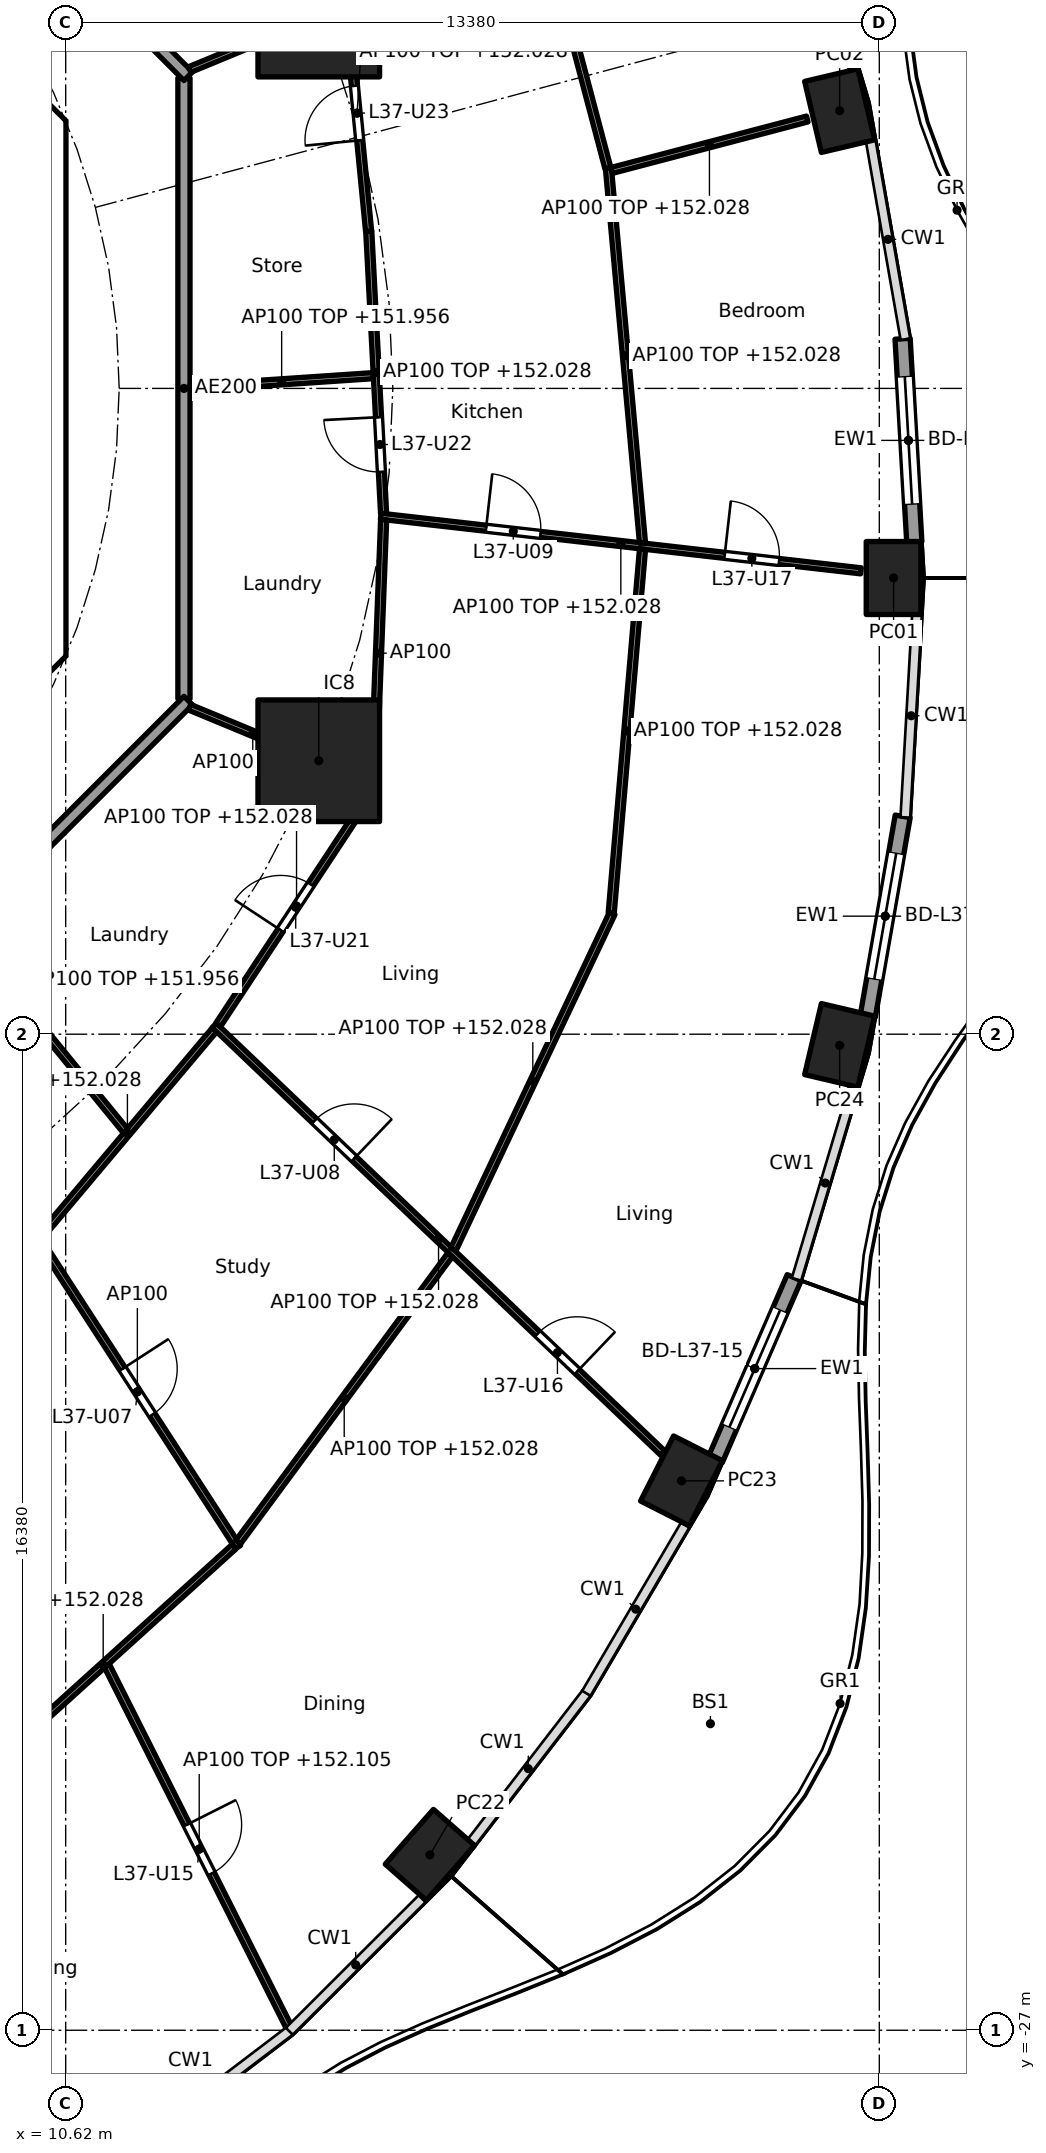
"""IFC4 building model, lengths in metres.
Left out: names, types, materials, properties, quantities, classifications, styles, units other than length and angle.
Written with IfcOpenShell. Run it as: python <this file> out.ifc"""

import sys

from ifc_helpers import new_model, si_unit, direction, frame, frame_2d, origin, origin_2d, place, context, subcontext, project, spatial, polyline, rectangle, hollow_rectangle, outline, extrude, element, fill, save


model = new_model("IFC4")
c1 = context("Model", 3, precision=1e-05, world=origin(), true_north=direction((0.0, 1.0)))
c2 = subcontext(c1, "Body", "Model", "MODEL_VIEW")
j1 = project(units=[si_unit("LENGTHUNIT", "METRE"), si_unit("PLANEANGLEUNIT", "RADIAN")], contexts=[c1])
p1 = place(None, origin())
s1 = spatial("IfcSite", under=j1, at=p1, CompositionType="ELEMENT")
p2 = place(p1, origin())
s2 = spatial("IfcBuilding", under=s1, at=p2, CompositionType="ELEMENT")
p3 = place(p2, frame((0.0, 0.0, 149.2)))
s3 = spatial("IfcBuildingStorey", under=s2, at=p3, CompositionType="ELEMENT", Elevation=149.2)
for number, where, z_axis, x_axis in (
    (1, (24.235, -3.118, 0.0), (0.0, 0.0, 1.0), (0.0, 1.0, 0.0)),
    (2, (23.348, 4.568, 0.0), (0.0, 0.0, 1.0), (-0.229, 0.973, 0.0)),
    (3, (16.61, -24.115, 0.0), (0.0, 0.0, 1.0), (0.66, 0.751, 0.0)),
    (4, (20.747, -17.965, 0.0), (0.0, 0.0, 1.0), (0.452, 0.892, 0.0)),
    (5, (23.348, -10.803, 0.0), (0.0, 0.0, 1.0), (0.229, 0.973, 0.0)),
):
    element("IfcColumn", number, at=place(p3, frame(where, z_axis=z_axis, x_axis=x_axis)), inside=s3, PredefinedType="COLUMN", context=c2, shape_type="SweptSolid", body=[
        extrude(hollow_rectangle(XDim=1.2, YDim=0.9, WallThickness=0.04, at=origin_2d()), origin(), (0.0, 0.0, 1.0), 3.7),
    ])
for number, where, z_axis, x_axis in (
    (6, (14.782, 6.123, 0.0), (0.0, 0.0, 1.0), (1.0, 0.0, 0.0)),
    (7, (14.782, -6.123, 0.0), (0.0, 0.0, 1.0), (1.0, 0.0, 0.0)),
):
    element("IfcColumn", number, at=place(p3, frame(where, z_axis=z_axis, x_axis=x_axis)), inside=s3, PredefinedType="COLUMN", context=c2, shape_type="SweptSolid", body=[
        extrude(rectangle(XDim=2.0, YDim=2.0, at=origin_2d()), origin(), (0.0, 0.0, 1.0), 3.7),
    ])
p4 = place(p3, frame((24.383, 0.816, 0.0), z_axis=(0.0, 0.0, 1.0), x_axis=(0.05746514539, -0.998347513176, 0.0)))
e8 = element("IfcWall", 8, at=p4, inside=s3, PredefinedType="SOLIDWALL", context=c2, shape_type="SweptSolid", body=[
    extrude(rectangle(XDim=3.348, YDim=0.25, at=frame_2d((1.674, 0.0))), origin(), (0.0, 0.0, 1.0), 3.44),
])
p5 = place(p4, frame((0.624, 0.0, 0.0)))
e9 = element("IfcOpeningElement", 9, at=p5, cuts=e8, PredefinedType="OPENING", context=c2, shape_type="SweptSolid", body=[
    extrude(rectangle(XDim=2.1, YDim=2.4, at=frame_2d((1.05, 1.2))), frame((0.0, 0.135, 0.0), z_axis=(0.0, -1.0, 0.0), x_axis=(1.0, 0.0, 0.0)), (0.0, 0.0, 1.0), 0.27),
])
p6 = place(p3, frame((22.6, -14.623, 0.0), z_axis=(0.0, 0.0, 1.0), x_axis=(-0.397575919276, -0.917569282622, 0.0)))
e10 = element("IfcWall", 10, at=p6, inside=s3, PredefinedType="SOLIDWALL", context=c2, shape_type="SweptSolid", body=[
    extrude(rectangle(XDim=3.261, YDim=0.25, at=frame_2d((1.63, 0.0))), origin(), (0.0, 0.0, 1.0), 3.44),
])
p7 = place(p6, frame((0.58, 0.0, 0.0)))
e11 = element("IfcOpeningElement", 11, at=p7, cuts=e10, PredefinedType="OPENING", context=c2, shape_type="SweptSolid", body=[
    extrude(rectangle(XDim=2.1, YDim=2.4, at=frame_2d((1.05, 1.2))), frame((0.0, 0.135, 0.0), z_axis=(0.0, -1.0, 0.0), x_axis=(1.0, 0.0, 0.0)), (0.0, 0.0, 1.0), 0.27),
])
p8 = place(p3, frame((24.385, -7.037, 0.0), z_axis=(0.0, 0.0, 1.0), x_axis=(-0.172163521006, -0.985068384446, 0.0)))
e12 = element("IfcWall", 12, at=p8, inside=s3, PredefinedType="SOLIDWALL", context=c2, shape_type="SweptSolid", body=[
    extrude(rectangle(XDim=3.333, YDim=0.25, at=frame_2d((1.666, 0.0))), origin(), (0.0, 0.0, 1.0), 3.44),
])
p9 = place(p8, frame((0.616, 0.0, 0.0)))
e13 = element("IfcOpeningElement", 13, at=p9, cuts=e12, PredefinedType="OPENING", context=c2, shape_type="SweptSolid", body=[
    extrude(rectangle(XDim=2.1, YDim=2.4, at=frame_2d((1.05, 1.2))), frame((0.0, 0.135, 0.0), z_axis=(0.0, -1.0, 0.0), x_axis=(1.0, 0.0, 0.0)), (0.0, 0.0, 1.0), 0.27),
])
p10 = place(p3, origin())
e14 = element("IfcWall", 14, at=p10, inside=s3, PredefinedType="SHEAR", context=c2, shape_type="SweptSolid", body=[
    extrude(outline(polyline([(9.776, -4.401), (10.025, -4.152), (10.025, -3.801), (10.025, 4.152), (9.776, 4.401), (10.2, 4.825), (10.625, 4.401), (10.625, -4.401), (10.2, -4.825), (9.776, -4.401)])), origin(), (0.0, 0.0, 1.0), 3.44),
])
p11 = place(p3, frame((12.565, -5.104, 0.0), z_axis=(0.0, 0.0, 1.0), x_axis=(0.0, 1.0, 0.0)))
e15 = element("IfcWall", 15, at=p11, inside=s3, PredefinedType="PARTITIONING", context=c2, shape_type="SweptSolid", body=[
    extrude(rectangle(XDim=10.209, YDim=0.2, at=frame_2d((5.104, 0.0))), origin(), (0.0, 0.0, 1.0), 3.44),
])
p12 = place(p3, frame((12.635, 5.134, 0.0), z_axis=(0.0, 0.0, 1.0), x_axis=(-0.707106781187, 0.707106781187, 0.0)))
e16 = element("IfcWall", 16, at=p12, inside=s3, PredefinedType="PARTITIONING", context=c2, shape_type="SweptSolid", body=[
    extrude(rectangle(XDim=10.609, YDim=0.2, at=frame_2d((5.305, 0.0))), origin(), (0.0, 0.0, 1.0), 3.44),
])
p13 = place(p3, frame((5.275, -12.494, 0.0), z_axis=(0.0, 0.0, 1.0), x_axis=(0.707106781187, 0.707106781187, 0.0)))
e17 = element("IfcWall", 17, at=p13, inside=s3, PredefinedType="PARTITIONING", context=c2, shape_type="SweptSolid", body=[
    extrude(rectangle(XDim=10.409, YDim=0.2, at=frame_2d((5.205, 0.0))), origin(), (0.0, 0.0, 1.0), 3.44),
])
p14 = place(p3, frame((15.801, -2.103, 0.0), z_axis=(0.0, 0.0, 1.0), x_axis=(0.993607212763, -0.112892456544, 0.0)))
e18 = element("IfcWall", 18, at=p14, inside=s3, PredefinedType="PARTITIONING", context=c2, shape_type="SweptSolid", body=[
    extrude(rectangle(XDim=7.948, YDim=0.1, at=frame_2d((3.974, 0.0))), origin(), (0.0, 0.0, 1.0), 2.828),
])
p15 = place(p14, frame((1.743, 0.0, 0.0)))
e19 = element("IfcOpeningElement", 19, at=p15, cuts=e18, PredefinedType="OPENING", context=c2, shape_type="SweptSolid", body=[
    extrude(rectangle(XDim=0.9, YDim=2.1, at=frame_2d((0.45, 1.05))), frame((0.0, 0.06, 0.0), z_axis=(0.0, -1.0, 0.0), x_axis=(1.0, 0.0, 0.0)), (0.0, 0.0, 1.0), 0.12),
])
p16 = place(p14, frame((5.692, 0.0, 0.0)))
e20 = element("IfcOpeningElement", 20, at=p16, cuts=e18, PredefinedType="OPENING", context=c2, shape_type="SweptSolid", body=[
    extrude(rectangle(XDim=0.9, YDim=2.1, at=frame_2d((0.45, 1.05))), frame((0.0, 0.06, 0.0), z_axis=(0.0, -1.0, 0.0), x_axis=(1.0, 0.0, 0.0)), (0.0, 0.0, 1.0), 0.12),
])
p17 = place(p3, frame((15.848, -2.058, 0.0), z_axis=(0.0, 0.0, 1.0), x_axis=(-0.052509224895, 0.998620439056, 0.0)))
e21 = element("IfcWall", 21, at=p17, inside=s3, PredefinedType="PARTITIONING", context=c2, shape_type="SweptSolid", body=[
    extrude(rectangle(XDim=4.649, YDim=0.1, at=frame_2d((2.325, 0.0))), origin(), (0.0, 0.0, 1.0), 2.828),
])
p18 = place(p17, frame((0.687, 0.0, 0.0)))
e22 = element("IfcOpeningElement", 22, at=p18, cuts=e21, PredefinedType="OPENING", context=c2, shape_type="SweptSolid", body=[
    extrude(rectangle(XDim=0.9, YDim=2.1, at=frame_2d((0.45, 1.05))), frame((0.0, 0.06, 0.0), z_axis=(0.0, -1.0, 0.0), x_axis=(1.0, 0.0, 0.0)), (0.0, 0.0, 1.0), 0.12),
])
p19 = place(p3, frame((15.849, -2.158, 0.0), z_axis=(0.0, 0.0, 1.0), x_axis=(-0.038390448414, -0.999262815014, 0.0)))
e23 = element("IfcWall", 23, at=p19, inside=s3, PredefinedType="PARTITIONING", context=c2, shape_type="SweptSolid", body=[
    extrude(rectangle(XDim=4.394, YDim=0.1, at=frame_2d((2.197, 0.0))), origin(), (0.0, 0.0, 1.0), 3.44),
])
p20 = place(p3, frame((20.106, -2.542, 0.0), z_axis=(0.0, 0.0, 1.0), x_axis=(-0.090567755363, 0.995890296011, 0.0)))
e24 = element("IfcWall", 24, at=p20, inside=s3, PredefinedType="PARTITIONING", context=c2, shape_type="SweptSolid", body=[
    extrude(rectangle(XDim=6.189, YDim=0.1, at=frame_2d((3.095, 0.0))), origin(), (0.0, 0.0, 1.0), 2.828),
])
p21 = place(p3, frame((20.106, -2.642, 0.0), z_axis=(0.0, 0.0, 1.0), x_axis=(-0.085672025822, -0.996323393277, 0.0)))
e25 = element("IfcWall", 25, at=p21, inside=s3, PredefinedType="PARTITIONING", context=c2, shape_type="SweptSolid", body=[
    extrude(rectangle(XDim=6.007, YDim=0.1, at=frame_2d((3.003, 0.0))), origin(), (0.0, 0.0, 1.0), 2.828),
])
p22 = place(p3, frame((12.665, 0.007, 0.0), z_axis=(0.0, 0.0, 1.0), x_axis=(0.997736982365, 0.067237742534, 0.0)))
e26 = element("IfcWall", 26, at=p22, inside=s3, PredefinedType="PARTITIONING", context=c2, shape_type="SweptSolid", body=[
    extrude(rectangle(XDim=3.021, YDim=0.1, at=frame_2d((1.51, 0.0))), origin(), (0.0, 0.0, 1.0), 2.756),
])
p23 = place(p3, frame((15.602, 2.584, 0.0), z_axis=(0.0, 0.0, 1.0), x_axis=(-0.097207196705, 0.995264166394, 0.0)))
e27 = element("IfcWall", 27, at=p23, inside=s3, PredefinedType="PARTITIONING", context=c2, shape_type="SweptSolid", body=[
    extrude(rectangle(XDim=3.906, YDim=0.1, at=frame_2d((1.953, 0.0))), origin(), (0.0, 0.0, 1.0), 2.828),
])
p24 = place(p23, frame((1.503, 0.0, 0.0)))
e28 = element("IfcOpeningElement", 28, at=p24, cuts=e27, PredefinedType="OPENING", context=c2, shape_type="SweptSolid", body=[
    extrude(rectangle(XDim=0.9, YDim=2.1, at=frame_2d((0.45, 1.05))), frame((0.0, 0.06, 0.0), z_axis=(0.0, -1.0, 0.0), x_axis=(1.0, 0.0, 0.0)), (0.0, 0.0, 1.0), 0.12),
])
p25 = place(p3, frame((19.598, 3.584, 0.0), z_axis=(0.0, 0.0, 1.0), x_axis=(0.967108750962, 0.254363251695, 0.0)))
e29 = element("IfcWall", 29, at=p25, inside=s3, PredefinedType="PARTITIONING", context=c2, shape_type="SweptSolid", body=[
    extrude(rectangle(XDim=3.327, YDim=0.1, at=frame_2d((1.663, 0.0))), origin(), (0.0, 0.0, 1.0), 2.828),
])
p26 = place(p3, frame((19.537, 3.62, 0.0), z_axis=(0.0, 0.0, 1.0), x_axis=(-0.255892560316, 0.966705227862, 0.0)))
e30 = element("IfcWall", 30, at=p26, inside=s3, PredefinedType="PARTITIONING", context=c2, shape_type="SweptSolid", body=[
    extrude(rectangle(XDim=5.659, YDim=0.1, at=frame_2d((2.829, 0.0))), origin(), (0.0, 0.0, 1.0), 2.828),
])
p27 = place(p3, frame((12.657, 5.243, 0.0), z_axis=(0.0, 0.0, 1.0), x_axis=(0.923848837015, 0.382757529444, 0.0)))
e31 = element("IfcWall", 31, at=p27, inside=s3, PredefinedType="PARTITIONING", context=c2, shape_type="SweptSolid", body=[
    extrude(rectangle(XDim=2.25, YDim=0.1, at=frame_2d((1.125, 0.0))), origin(), (0.0, 0.0, 1.0), 3.44),
])
p28 = place(p3, frame((9.084, -22.941, 0.0), z_axis=(0.0, 0.0, 1.0), x_axis=(0.741684187175, 0.670749257543, 0.0)))
e32 = element("IfcWall", 32, at=p28, inside=s3, PredefinedType="PARTITIONING", context=c2, shape_type="SweptSolid", body=[
    extrude(rectangle(XDim=5.806, YDim=0.1, at=frame_2d((2.903, 0.0))), origin(), (0.0, 0.0, 1.0), 2.828),
])
p29 = place(p3, frame((11.296, -21.005, 0.0), z_axis=(0.0, 0.0, 1.0), x_axis=(0.44991509116, -0.893071335755, 0.0)))
e33 = element("IfcWall", 33, at=p29, inside=s3, PredefinedType="PARTITIONING", context=c2, shape_type="SweptSolid", body=[
    extrude(rectangle(XDim=6.755, YDim=0.1, at=frame_2d((3.377, 0.0))), origin(), (0.0, 0.0, 1.0), 2.905),
])
p30 = place(p29, frame((2.927, 0.0, 0.0)))
e34 = element("IfcOpeningElement", 34, at=p30, cuts=e33, PredefinedType="OPENING", context=c2, shape_type="SweptSolid", body=[
    extrude(rectangle(XDim=0.9, YDim=2.1, at=frame_2d((0.45, 1.05))), frame((0.0, 0.06, 0.0), z_axis=(0.0, -1.0, 0.0), x_axis=(1.0, 0.0, 0.0)), (0.0, 0.0, 1.0), 0.12),
])
p31 = place(p3, frame((10.143, -13.946, 0.0), z_axis=(0.0, 0.0, 1.0), x_axis=(0.543872968754, -0.839167560061, 0.0)))
e35 = element("IfcWall", 35, at=p31, inside=s3, PredefinedType="PARTITIONING", context=c2, shape_type="SweptSolid", body=[
    extrude(rectangle(XDim=6.088, YDim=0.1, at=frame_2d((3.044, 0.0))), origin(), (0.0, 0.0, 1.0), 3.44),
])
p32 = place(p31, frame((2.594, 0.0, 0.0)))
e36 = element("IfcOpeningElement", 36, at=p32, cuts=e35, PredefinedType="OPENING", context=c2, shape_type="SweptSolid", body=[
    extrude(rectangle(XDim=0.9, YDim=2.1, at=frame_2d((0.45, 1.05))), frame((0.0, 0.06, 0.0), z_axis=(0.0, -1.0, 0.0), x_axis=(1.0, 0.0, 0.0)), (0.0, 0.0, 1.0), 0.12),
])
p33 = place(p3, frame((10.202, -13.95, 0.0), z_axis=(0.0, 0.0, 1.0), x_axis=(0.644068144287, 0.764968120587, 0.0)))
e37 = element("IfcWall", 37, at=p33, inside=s3, PredefinedType="PARTITIONING", context=c2, shape_type="SweptSolid", body=[
    extrude(rectangle(XDim=4.449, YDim=0.1, at=frame_2d((2.224, 0.0))), origin(), (0.0, 0.0, 1.0), 2.828),
])
p34 = place(p3, frame((13.457, -18.973, 0.0), z_axis=(0.0, 0.0, 1.0), x_axis=(0.593532053206, 0.80481035146, 0.0)))
e38 = element("IfcWall", 38, at=p34, inside=s3, PredefinedType="PARTITIONING", context=c2, shape_type="SweptSolid", body=[
    extrude(rectangle(XDim=5.876, YDim=0.1, at=frame_2d((2.938, 0.0))), origin(), (0.0, 0.0, 1.0), 2.828),
])
p35 = place(p3, frame((8.948, -8.962, 0.0), z_axis=(0.0, 0.0, 1.0), x_axis=(0.633041272858, -0.774118044524, 0.0)))
e39 = element("IfcWall", 39, at=p35, inside=s3, PredefinedType="PARTITIONING", context=c2, shape_type="SweptSolid", body=[
    extrude(rectangle(XDim=4.195, YDim=0.1, at=frame_2d((2.097, 0.0))), origin(), (0.0, 0.0, 1.0), 2.756),
])
p36 = place(p3, frame((13.064, -10.474, 0.0), z_axis=(0.0, 0.0, 1.0), x_axis=(0.723627371706, -0.690190862673, 0.0)))
e40 = element("IfcWall", 40, at=p36, inside=s3, PredefinedType="PARTITIONING", context=c2, shape_type="SweptSolid", body=[
    extrude(rectangle(XDim=10.193, YDim=0.1, at=frame_2d((5.097, 0.0))), origin(), (0.0, 0.0, 1.0), 2.828),
])
p37 = place(p36, frame((2.277, 0.0, 0.0)))
e41 = element("IfcOpeningElement", 41, at=p37, cuts=e40, PredefinedType="OPENING", context=c2, shape_type="SweptSolid", body=[
    extrude(rectangle(XDim=0.9, YDim=2.1, at=frame_2d((0.45, 1.05))), frame((0.0, 0.06, 0.0), z_axis=(0.0, -1.0, 0.0), x_axis=(1.0, 0.0, 0.0)), (0.0, 0.0, 1.0), 0.12),
])
p38 = place(p36, frame((7.348, 0.0, 0.0)))
e42 = element("IfcOpeningElement", 42, at=p38, cuts=e40, PredefinedType="OPENING", context=c2, shape_type="SweptSolid", body=[
    extrude(rectangle(XDim=0.9, YDim=2.1, at=frame_2d((0.45, 1.05))), frame((0.0, 0.06, 0.0), z_axis=(0.0, -1.0, 0.0), x_axis=(1.0, 0.0, 0.0)), (0.0, 0.0, 1.0), 0.12),
])
p39 = place(p3, frame((13.127, -10.467, 0.0), z_axis=(0.0, 0.0, 1.0), x_axis=(0.550614843759, 0.834759422727, 0.0)))
e43 = element("IfcWall", 43, at=p39, inside=s3, PredefinedType="PARTITIONING", context=c2, shape_type="SweptSolid", body=[
    extrude(rectangle(XDim=4.683, YDim=0.1, at=frame_2d((2.341, 0.0))), origin(), (0.0, 0.0, 1.0), 2.828),
])
p40 = place(p39, frame((1.866, 0.0, 0.0)))
e44 = element("IfcOpeningElement", 44, at=p40, cuts=e43, PredefinedType="OPENING", context=c2, shape_type="SweptSolid", body=[
    extrude(rectangle(XDim=0.9, YDim=2.1, at=frame_2d((0.45, 1.05))), frame((0.0, 0.06, 0.0), z_axis=(0.0, -1.0, 0.0), x_axis=(1.0, 0.0, 0.0)), (0.0, 0.0, 1.0), 0.12),
])
p41 = place(p3, frame((16.995, -14.158, 0.0), z_axis=(0.0, 0.0, 1.0), x_axis=(0.427456178439, 0.904036069808, 0.0)))
e45 = element("IfcWall", 45, at=p41, inside=s3, PredefinedType="PARTITIONING", context=c2, shape_type="SweptSolid", body=[
    extrude(rectangle(XDim=6.113, YDim=0.1, at=frame_2d((3.057, 0.0))), origin(), (0.0, 0.0, 1.0), 2.828),
])
p42 = place(p3, frame((12.657, -5.243, 0.0), z_axis=(0.0, 0.0, 1.0), x_axis=(0.923864733477, -0.382719158442, 0.0)))
e46 = element("IfcWall", 46, at=p42, inside=s3, PredefinedType="PARTITIONING", context=c2, shape_type="SweptSolid", body=[
    extrude(rectangle(XDim=2.25, YDim=0.1, at=frame_2d((1.125, 0.0))), origin(), (0.0, 0.0, 1.0), 3.44),
])
p43 = place(p5, origin())
e47 = element("IfcDoor", 47, at=p43, inside=s3, OperationType="SLIDING_TO_LEFT", PredefinedType="DOOR", context=c2, shape_type="SweptSolid", body=[
    extrude(rectangle(XDim=2.1, YDim=2.4, at=frame_2d((1.05, 1.2))), frame((0.0, 0.025, 0.0), z_axis=(0.0, -1.0, 0.0), x_axis=(1.0, 0.0, 0.0)), (0.0, 0.0, 1.0), 0.05),
])
fill(e9, e47)
p44 = place(p7, origin())
e48 = element("IfcDoor", 48, at=p44, inside=s3, OperationType="SLIDING_TO_LEFT", PredefinedType="DOOR", context=c2, shape_type="SweptSolid", body=[
    extrude(rectangle(XDim=2.1, YDim=2.4, at=frame_2d((1.05, 1.2))), frame((0.0, 0.025, 0.0), z_axis=(0.0, -1.0, 0.0), x_axis=(1.0, 0.0, 0.0)), (0.0, 0.0, 1.0), 0.05),
])
fill(e11, e48)
p45 = place(p9, origin())
e49 = element("IfcDoor", 49, at=p45, inside=s3, OperationType="SLIDING_TO_LEFT", PredefinedType="DOOR", context=c2, shape_type="SweptSolid", body=[
    extrude(rectangle(XDim=2.1, YDim=2.4, at=frame_2d((1.05, 1.2))), frame((0.0, 0.025, 0.0), z_axis=(0.0, -1.0, 0.0), x_axis=(1.0, 0.0, 0.0)), (0.0, 0.0, 1.0), 0.05),
])
fill(e13, e49)
p46 = place(p32, origin())
e50 = element("IfcDoor", 50, at=p46, inside=s3, OperationType="SINGLE_SWING_LEFT", PredefinedType="DOOR", context=c2, shape_type="SweptSolid", body=[
    extrude(rectangle(XDim=0.9, YDim=2.1, at=frame_2d((0.45, 1.05))), frame((0.0, 0.025, 0.0), z_axis=(0.0, -1.0, 0.0), x_axis=(1.0, 0.0, 0.0)), (0.0, 0.0, 1.0), 0.05),
])
fill(e36, e50)
p47 = place(p37, origin())
e51 = element("IfcDoor", 51, at=p47, inside=s3, OperationType="SINGLE_SWING_RIGHT", PredefinedType="DOOR", context=c2, shape_type="SweptSolid", body=[
    extrude(rectangle(XDim=0.9, YDim=2.1, at=frame_2d((0.45, 1.05))), frame((0.0, 0.025, 0.0), z_axis=(0.0, -1.0, 0.0), x_axis=(1.0, 0.0, 0.0)), (0.0, 0.0, 1.0), 0.05),
])
fill(e41, e51)
p48 = place(p15, origin())
e52 = element("IfcDoor", 52, at=p48, inside=s3, OperationType="SINGLE_SWING_LEFT", PredefinedType="DOOR", context=c2, shape_type="SweptSolid", body=[
    extrude(rectangle(XDim=0.9, YDim=2.1, at=frame_2d((0.45, 1.05))), frame((0.0, 0.025, 0.0), z_axis=(0.0, -1.0, 0.0), x_axis=(1.0, 0.0, 0.0)), (0.0, 0.0, 1.0), 0.05),
])
fill(e19, e52)
p49 = place(p30, origin())
e53 = element("IfcDoor", 53, at=p49, inside=s3, OperationType="SINGLE_SWING_LEFT", PredefinedType="DOOR", context=c2, shape_type="SweptSolid", body=[
    extrude(rectangle(XDim=0.9, YDim=2.1, at=frame_2d((0.45, 1.05))), frame((0.0, 0.025, 0.0), z_axis=(0.0, -1.0, 0.0), x_axis=(1.0, 0.0, 0.0)), (0.0, 0.0, 1.0), 0.05),
])
fill(e34, e53)
p50 = place(p38, origin())
e54 = element("IfcDoor", 54, at=p50, inside=s3, OperationType="SINGLE_SWING_RIGHT", PredefinedType="DOOR", context=c2, shape_type="SweptSolid", body=[
    extrude(rectangle(XDim=0.9, YDim=2.1, at=frame_2d((0.45, 1.05))), frame((0.0, 0.025, 0.0), z_axis=(0.0, -1.0, 0.0), x_axis=(1.0, 0.0, 0.0)), (0.0, 0.0, 1.0), 0.05),
])
fill(e42, e54)
p51 = place(p16, origin())
e55 = element("IfcDoor", 55, at=p51, inside=s3, OperationType="SINGLE_SWING_LEFT", PredefinedType="DOOR", context=c2, shape_type="SweptSolid", body=[
    extrude(rectangle(XDim=0.9, YDim=2.1, at=frame_2d((0.45, 1.05))), frame((0.0, 0.025, 0.0), z_axis=(0.0, -1.0, 0.0), x_axis=(1.0, 0.0, 0.0)), (0.0, 0.0, 1.0), 0.05),
])
fill(e20, e55)
p52 = place(p40, origin())
e56 = element("IfcDoor", 56, at=p52, inside=s3, OperationType="SINGLE_SWING_LEFT", PredefinedType="DOOR", context=c2, shape_type="SweptSolid", body=[
    extrude(rectangle(XDim=0.9, YDim=2.1, at=frame_2d((0.45, 1.05))), frame((0.0, 0.025, 0.0), z_axis=(0.0, -1.0, 0.0), x_axis=(1.0, 0.0, 0.0)), (0.0, 0.0, 1.0), 0.05),
])
fill(e44, e56)
p53 = place(p18, origin())
e57 = element("IfcDoor", 57, at=p53, inside=s3, OperationType="SINGLE_SWING_RIGHT", PredefinedType="DOOR", context=c2, shape_type="SweptSolid", body=[
    extrude(rectangle(XDim=0.9, YDim=2.1, at=frame_2d((0.45, 1.05))), frame((0.0, 0.025, 0.0), z_axis=(0.0, -1.0, 0.0), x_axis=(1.0, 0.0, 0.0)), (0.0, 0.0, 1.0), 0.05),
])
fill(e22, e57)
p54 = place(p24, origin())
e58 = element("IfcDoor", 58, at=p54, inside=s3, OperationType="SINGLE_SWING_LEFT", PredefinedType="DOOR", context=c2, shape_type="SweptSolid", body=[
    extrude(rectangle(XDim=0.9, YDim=2.1, at=frame_2d((0.45, 1.05))), frame((0.0, 0.025, 0.0), z_axis=(0.0, -1.0, 0.0), x_axis=(1.0, 0.0, 0.0)), (0.0, 0.0, 1.0), 0.05),
])
fill(e28, e58)
save(model, sys.argv[1])
